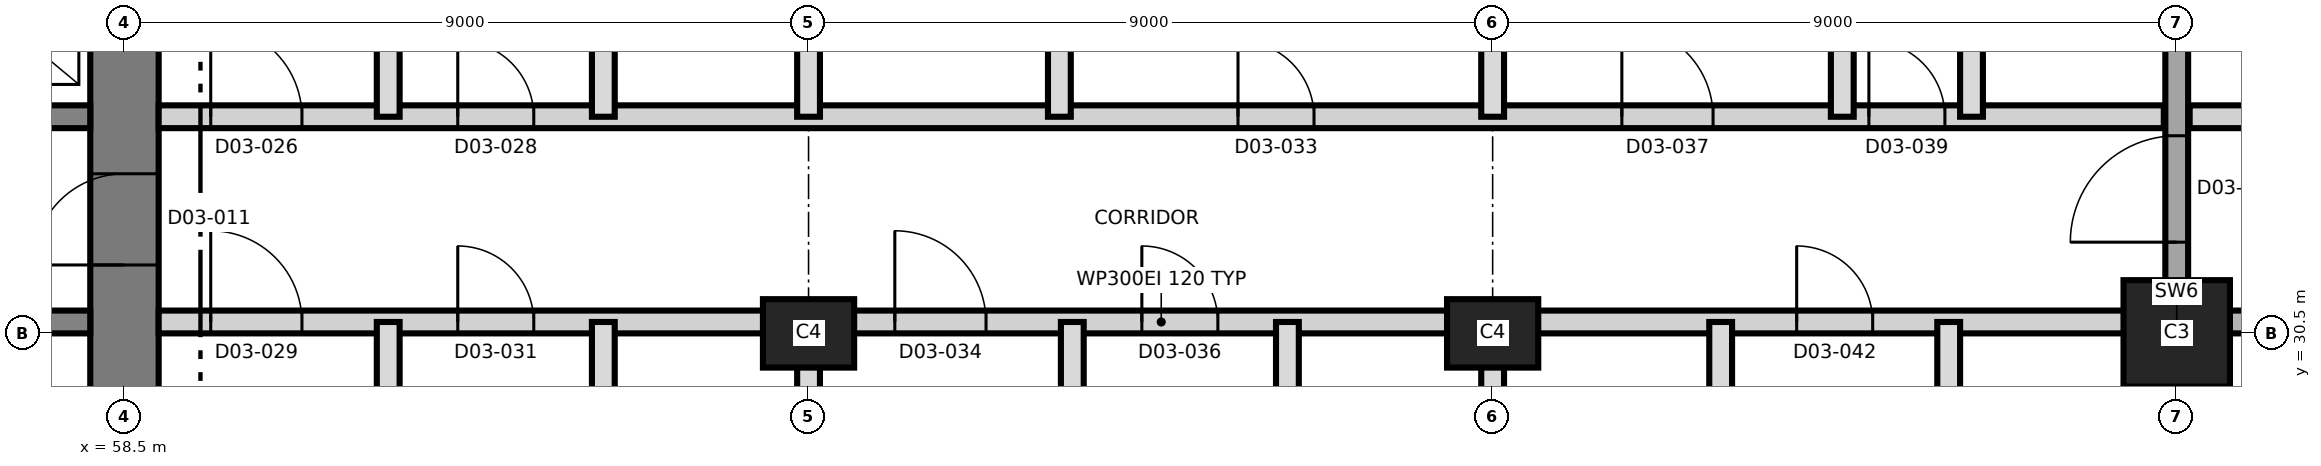
"""IFC4 building model, lengths in metres.
Left out: names, types, materials, properties, quantities, classifications, styles, units other than length and angle.
Written with IfcOpenShell. Run it as: python <this file> out.ifc"""

import sys

from ifc_helpers import new_model, si_unit, direction, frame, frame_2d, origin, origin_2d, place, context, subcontext, project, spatial, rectangle, extrude, element, fill, save


model = new_model("IFC4")
c1 = context("Model", 3, precision=1e-05, world=origin(), true_north=direction((0.0, 1.0)))
c2 = subcontext(c1, "Body", "Model", "MODEL_VIEW")
j1 = project(units=[si_unit("LENGTHUNIT", "METRE"), si_unit("PLANEANGLEUNIT", "RADIAN")], contexts=[c1])
p1 = place(None, origin())
s1 = spatial("IfcSite", under=j1, at=p1, CompositionType="ELEMENT")
p2 = place(p1, origin())
s2 = spatial("IfcBuilding", under=s1, at=p2, CompositionType="ELEMENT")
p3 = place(p2, frame((0.0, 0.0, 52.0)))
s3 = spatial("IfcBuildingStorey", under=s2, at=p3, CompositionType="ELEMENT", Elevation=52.0)
p4 = place(p3, frame((58.5, 21.05, 0.0), z_axis=(0.0, 0.0, 1.0), x_axis=(0.0, 1.0, 0.0)))
e1 = element("IfcWall", 1, at=p4, inside=s3, PredefinedType="SHEAR", context=c2, shape_type="SweptSolid", body=[
    extrude(rectangle(XDim=18.9, YDim=0.9, at=frame_2d((9.45, 0.0))), origin(), (0.0, 0.0, 1.0), 3.7),
])
p5 = place(p4, frame((10.35, 0.0, 0.0)))
e2 = element("IfcOpeningElement", 2, at=p5, cuts=e1, PredefinedType="OPENING", context=c2, shape_type="SweptSolid", body=[
    extrude(rectangle(XDim=1.2, YDim=2.1, at=frame_2d((0.6, 1.05))), frame((0.0, 0.46, 0.0), z_axis=(0.0, -1.0, 0.0), x_axis=(1.0, 0.0, 0.0)), (0.0, 0.0, 1.0), 0.92),
])
p6 = place(p3, frame((31.95, 30.65, 0.0), z_axis=(0.0, 0.0, 1.0), x_axis=(1.0, 0.0, 0.0)))
e3 = element("IfcWall", 3, at=p6, inside=s3, PredefinedType="SHEAR", context=c2, shape_type="SweptSolid", body=[
    extrude(rectangle(XDim=26.1, YDim=0.3, at=frame_2d((13.05, 0.0))), origin(), (0.0, 0.0, 1.0), 3.7),
])
p7 = place(p6, frame((24.55, 0.0, 0.0)))
e4 = element("IfcOpeningElement", 4, at=p7, cuts=e3, PredefinedType="OPENING", context=c2, shape_type="SweptSolid", body=[
    extrude(rectangle(XDim=1.0, YDim=2.1, at=frame_2d((0.5, 1.05))), frame((0.0, 0.16, 0.0), z_axis=(0.0, -1.0, 0.0), x_axis=(1.0, 0.0, 0.0)), (0.0, 0.0, 1.0), 0.32),
])
p8 = place(p6, frame((11.35, 0.0, 0.0)))
e5 = element("IfcOpeningElement", 5, at=p8, cuts=e3, PredefinedType="OPENING", context=c2, shape_type="SweptSolid", body=[
    extrude(rectangle(XDim=1.0, YDim=2.1, at=frame_2d((0.5, 1.05))), frame((0.0, 0.16, 0.0), z_axis=(0.0, -1.0, 0.0), x_axis=(1.0, 0.0, 0.0)), (0.0, 0.0, 1.0), 0.32),
])
p9 = place(p3, frame((31.95, 33.35, 0.0), z_axis=(0.0, 0.0, 1.0), x_axis=(1.0, 0.0, 0.0)))
e6 = element("IfcWall", 6, at=p9, inside=s3, PredefinedType="SHEAR", context=c2, shape_type="SweptSolid", body=[
    extrude(rectangle(XDim=26.1, YDim=0.3, at=frame_2d((13.05, 0.0))), origin(), (0.0, 0.0, 1.0), 3.7),
])
p10 = place(p9, frame((13.125, 0.0, 0.0)))
e7 = element("IfcOpeningElement", 7, at=p10, cuts=e6, PredefinedType="OPENING", context=c2, shape_type="SweptSolid", body=[
    extrude(rectangle(XDim=1.4, YDim=2.1, at=frame_2d((0.7, 1.05))), frame((0.0, 0.16, 0.0), z_axis=(0.0, -1.0, 0.0), x_axis=(1.0, 0.0, 0.0)), (0.0, 0.0, 1.0), 0.32),
])
p11 = place(p9, frame((5.175, 0.0, 0.0)))
e8 = element("IfcOpeningElement", 8, at=p11, cuts=e6, PredefinedType="OPENING", context=c2, shape_type="SweptSolid", body=[
    extrude(rectangle(XDim=1.2, YDim=2.1, at=frame_2d((0.6, 1.05))), frame((0.0, 0.16, 0.0), z_axis=(0.0, -1.0, 0.0), x_axis=(1.0, 0.0, 0.0)), (0.0, 0.0, 1.0), 0.32),
])
p12 = place(p9, frame((19.725, 0.0, 0.0)))
e9 = element("IfcOpeningElement", 9, at=p12, cuts=e6, PredefinedType="OPENING", context=c2, shape_type="SweptSolid", body=[
    extrude(rectangle(XDim=1.2, YDim=2.1, at=frame_2d((0.6, 1.05))), frame((0.0, 0.16, 0.0), z_axis=(0.0, -1.0, 0.0), x_axis=(1.0, 0.0, 0.0)), (0.0, 0.0, 1.0), 0.32),
])
for number, where, z_axis, x_axis in (
    (10, (67.5, 30.5, 0.0), (0.0, 0.0, 1.0), (1.0, 0.0, 0.0)),
    (11, (76.5, 30.5, 0.0), (0.0, 0.0, 1.0), (1.0, 0.0, 0.0)),
):
    element("IfcColumn", number, at=place(p3, frame(where, z_axis=z_axis, x_axis=x_axis)), inside=s3, PredefinedType="COLUMN", context=c2, shape_type="SweptSolid", body=[
        extrude(rectangle(XDim=1.2, YDim=0.9, at=origin_2d()), origin(), (0.0, 0.0, 1.0), 3.7),
    ])
p13 = place(p3, frame((85.5, 30.5, 0.0), z_axis=(0.0, 0.0, 1.0), x_axis=(1.0, 0.0, 0.0)))
e12 = element("IfcColumn", 12, at=p13, inside=s3, PredefinedType="COLUMN", context=c2, shape_type="SweptSolid", body=[
    extrude(rectangle(XDim=1.4, YDim=1.4, at=origin_2d()), origin(), (0.0, 0.0, 1.0), 3.7),
])
p14 = place(p3, frame((85.5, 19.705, 0.0), z_axis=(0.0, 0.0, 1.0), x_axis=(0.0, 1.0, 0.0)))
e13 = element("IfcWall", 13, at=p14, inside=s3, PredefinedType="SHEAR", context=c2, shape_type="SweptSolid", body=[
    extrude(rectangle(XDim=21.59, YDim=0.3, at=frame_2d((10.795, 0.0))), origin(), (0.0, 0.0, 1.0), 3.7),
])
p15 = place(p14, frame((11.995, 0.0, 0.0)))
e14 = element("IfcOpeningElement", 14, at=p15, cuts=e13, PredefinedType="OPENING", context=c2, shape_type="SweptSolid", body=[
    extrude(rectangle(XDim=1.4, YDim=2.1, at=frame_2d((0.7, 1.05))), frame((0.0, 0.16, 0.0), z_axis=(0.0, -1.0, 0.0), x_axis=(1.0, 0.0, 0.0)), (0.0, 0.0, 1.0), 0.32),
])
p16 = place(p3, frame((58.95, 30.65, 0.0), z_axis=(0.0, 0.0, 1.0), x_axis=(1.0, 0.0, 0.0)))
e15 = element("IfcWall", 15, at=p16, inside=s3, PredefinedType="PARTITIONING", context=c2, shape_type="SweptSolid", body=[
    extrude(rectangle(XDim=26.38, YDim=0.3, at=frame_2d((13.19, 0.0))), origin(), (0.0, 0.0, 1.0), 3.4),
])
p17 = place(p16, frame((0.685, 0.0, 0.0)))
e16 = element("IfcOpeningElement", 16, at=p17, cuts=e15, PredefinedType="OPENING", context=c2, shape_type="SweptSolid", body=[
    extrude(rectangle(XDim=1.2, YDim=2.1, at=frame_2d((0.6, 1.05))), frame((0.0, 0.16, 0.0), z_axis=(0.0, -1.0, 0.0), x_axis=(1.0, 0.0, 0.0)), (0.0, 0.0, 1.0), 0.32),
])
p18 = place(p16, frame((3.935, 0.0, 0.0)))
e17 = element("IfcOpeningElement", 17, at=p18, cuts=e15, PredefinedType="OPENING", context=c2, shape_type="SweptSolid", body=[
    extrude(rectangle(XDim=1.0, YDim=2.1, at=frame_2d((0.5, 1.05))), frame((0.0, 0.16, 0.0), z_axis=(0.0, -1.0, 0.0), x_axis=(1.0, 0.0, 0.0)), (0.0, 0.0, 1.0), 0.32),
])
p19 = place(p16, frame((9.685, 0.0, 0.0)))
e18 = element("IfcOpeningElement", 18, at=p19, cuts=e15, PredefinedType="OPENING", context=c2, shape_type="SweptSolid", body=[
    extrude(rectangle(XDim=1.2, YDim=2.1, at=frame_2d((0.6, 1.05))), frame((0.0, 0.16, 0.0), z_axis=(0.0, -1.0, 0.0), x_axis=(1.0, 0.0, 0.0)), (0.0, 0.0, 1.0), 0.32),
])
p20 = place(p16, frame((12.935, 0.0, 0.0)))
e19 = element("IfcOpeningElement", 19, at=p20, cuts=e15, PredefinedType="OPENING", context=c2, shape_type="SweptSolid", body=[
    extrude(rectangle(XDim=1.0, YDim=2.1, at=frame_2d((0.5, 1.05))), frame((0.0, 0.16, 0.0), z_axis=(0.0, -1.0, 0.0), x_axis=(1.0, 0.0, 0.0)), (0.0, 0.0, 1.0), 0.32),
])
p21 = place(p16, frame((21.55, 0.0, 0.0)))
e20 = element("IfcOpeningElement", 20, at=p21, cuts=e15, PredefinedType="OPENING", context=c2, shape_type="SweptSolid", body=[
    extrude(rectangle(XDim=1.0, YDim=2.4, at=frame_2d((0.5, 1.2))), frame((0.0, 0.16, 0.0), z_axis=(0.0, -1.0, 0.0), x_axis=(1.0, 0.0, 0.0)), (0.0, 0.0, 1.0), 0.32),
])
p22 = place(p3, frame((85.67, 30.65, 0.0), z_axis=(0.0, 0.0, 1.0), x_axis=(1.0, 0.0, 0.0)))
e21 = element("IfcWall", 21, at=p22, inside=s3, PredefinedType="SHEAR", context=c2, shape_type="SweptSolid", body=[
    extrude(rectangle(XDim=9.58, YDim=0.3, at=frame_2d((4.79, 0.0))), origin(), (0.0, 0.0, 1.0), 3.4),
])
p23 = place(p22, frame((2.08, 0.0, 0.0)))
e22 = element("IfcOpeningElement", 22, at=p23, cuts=e21, PredefinedType="OPENING", context=c2, shape_type="SweptSolid", body=[
    extrude(rectangle(XDim=1.2, YDim=2.1, at=frame_2d((0.6, 1.05))), frame((0.0, 0.16, 0.0), z_axis=(0.0, -1.0, 0.0), x_axis=(1.0, 0.0, 0.0)), (0.0, 0.0, 1.0), 0.32),
])
p24 = place(p22, frame((5.63, 0.0, 0.0)))
e23 = element("IfcOpeningElement", 23, at=p24, cuts=e21, PredefinedType="OPENING", context=c2, shape_type="SweptSolid", body=[
    extrude(rectangle(XDim=1.0, YDim=2.1, at=frame_2d((0.5, 1.05))), frame((0.0, 0.16, 0.0), z_axis=(0.0, -1.0, 0.0), x_axis=(1.0, 0.0, 0.0)), (0.0, 0.0, 1.0), 0.32),
])
p25 = place(p3, frame((58.95, 33.35, 0.0), z_axis=(0.0, 0.0, 1.0), x_axis=(1.0, 0.0, 0.0)))
e24 = element("IfcWall", 24, at=p25, inside=s3, PredefinedType="PARTITIONING", context=c2, shape_type="SweptSolid", body=[
    extrude(rectangle(XDim=26.38, YDim=0.3, at=frame_2d((13.19, 0.0))), origin(), (0.0, 0.0, 1.0), 3.4),
])
p26 = place(p25, frame((0.685, 0.0, 0.0)))
e25 = element("IfcOpeningElement", 25, at=p26, cuts=e24, PredefinedType="OPENING", context=c2, shape_type="SweptSolid", body=[
    extrude(rectangle(XDim=1.2, YDim=2.1, at=frame_2d((0.6, 1.05))), frame((0.0, 0.16, 0.0), z_axis=(0.0, -1.0, 0.0), x_axis=(1.0, 0.0, 0.0)), (0.0, 0.0, 1.0), 0.32),
])
p27 = place(p25, frame((3.935, 0.0, 0.0)))
e26 = element("IfcOpeningElement", 26, at=p27, cuts=e24, PredefinedType="OPENING", context=c2, shape_type="SweptSolid", body=[
    extrude(rectangle(XDim=1.0, YDim=2.1, at=frame_2d((0.5, 1.05))), frame((0.0, 0.16, 0.0), z_axis=(0.0, -1.0, 0.0), x_axis=(1.0, 0.0, 0.0)), (0.0, 0.0, 1.0), 0.32),
])
p28 = place(p25, frame((14.2, 0.0, 0.0)))
e27 = element("IfcOpeningElement", 27, at=p28, cuts=e24, PredefinedType="OPENING", context=c2, shape_type="SweptSolid", body=[
    extrude(rectangle(XDim=1.0, YDim=2.4, at=frame_2d((0.5, 1.2))), frame((0.0, 0.16, 0.0), z_axis=(0.0, -1.0, 0.0), x_axis=(1.0, 0.0, 0.0)), (0.0, 0.0, 1.0), 0.32),
])
p29 = place(p25, frame((19.25, 0.0, 0.0)))
e28 = element("IfcOpeningElement", 28, at=p29, cuts=e24, PredefinedType="OPENING", context=c2, shape_type="SweptSolid", body=[
    extrude(rectangle(XDim=1.2, YDim=2.1, at=frame_2d((0.6, 1.05))), frame((0.0, 0.16, 0.0), z_axis=(0.0, -1.0, 0.0), x_axis=(1.0, 0.0, 0.0)), (0.0, 0.0, 1.0), 0.32),
])
p30 = place(p25, frame((22.5, 0.0, 0.0)))
e29 = element("IfcOpeningElement", 29, at=p30, cuts=e24, PredefinedType="OPENING", context=c2, shape_type="SweptSolid", body=[
    extrude(rectangle(XDim=1.0, YDim=2.1, at=frame_2d((0.5, 1.05))), frame((0.0, 0.16, 0.0), z_axis=(0.0, -1.0, 0.0), x_axis=(1.0, 0.0, 0.0)), (0.0, 0.0, 1.0), 0.32),
])
p31 = place(p3, frame((85.67, 33.35, 0.0), z_axis=(0.0, 0.0, 1.0), x_axis=(1.0, 0.0, 0.0)))
e30 = element("IfcWall", 30, at=p31, inside=s3, PredefinedType="PARTITIONING", context=c2, shape_type="SweptSolid", body=[
    extrude(rectangle(XDim=9.58, YDim=0.3, at=frame_2d((4.79, 0.0))), origin(), (0.0, 0.0, 1.0), 3.4),
])
p32 = place(p31, frame((1.83, 0.0, 0.0)))
e31 = element("IfcOpeningElement", 31, at=p32, cuts=e30, PredefinedType="OPENING", context=c2, shape_type="SweptSolid", body=[
    extrude(rectangle(XDim=1.0, YDim=2.1, at=frame_2d((0.5, 1.05))), frame((0.0, 0.16, 0.0), z_axis=(0.0, -1.0, 0.0), x_axis=(1.0, 0.0, 0.0)), (0.0, 0.0, 1.0), 0.32),
])
p33 = place(p31, frame((5.63, 0.0, 0.0)))
e32 = element("IfcOpeningElement", 32, at=p33, cuts=e30, PredefinedType="OPENING", context=c2, shape_type="SweptSolid", body=[
    extrude(rectangle(XDim=1.0, YDim=2.1, at=frame_2d((0.5, 1.05))), frame((0.0, 0.16, 0.0), z_axis=(0.0, -1.0, 0.0), x_axis=(1.0, 0.0, 0.0)), (0.0, 0.0, 1.0), 0.32),
])
p34 = place(p3, frame((61.97, 19.705, 0.0), z_axis=(0.0, 0.0, 1.0), x_axis=(0.0, 1.0, 0.0)))
e33 = element("IfcWall", 33, at=p34, inside=s3, PredefinedType="PARTITIONING", context=c2, shape_type="SweptSolid", body=[
    extrude(rectangle(XDim=10.945, YDim=0.3, at=frame_2d((5.472, 0.0))), origin(), (0.0, 0.0, 1.0), 3.4),
])
p35 = place(p3, frame((61.97, 33.35, 0.0), z_axis=(0.0, 0.0, 1.0), x_axis=(0.0, 1.0, 0.0)))
e34 = element("IfcWall", 34, at=p35, inside=s3, PredefinedType="PARTITIONING", context=c2, shape_type="SweptSolid", body=[
    extrude(rectangle(XDim=8.125, YDim=0.3, at=frame_2d((4.062, 0.0))), origin(), (0.0, 0.0, 1.0), 3.4),
])
for number, where, z_axis, x_axis in (
    (35, (64.8, 27.45, 0.0), (0.0, 0.0, 1.0), (0.0, 1.0, 0.0)),
    (36, (64.8, 33.35, 0.0), (0.0, 0.0, 1.0), (0.0, 1.0, 0.0)),
):
    element("IfcWall", number, at=place(p3, frame(where, z_axis=z_axis, x_axis=x_axis)), inside=s3, PredefinedType="PARTITIONING", context=c2, shape_type="SweptSolid", body=[
        extrude(rectangle(XDim=3.2, YDim=0.3, at=frame_2d((1.6, 0.0))), origin(), (0.0, 0.0, 1.0), 3.4),
    ])
p36 = place(p3, frame((67.5, 19.705, 0.0), z_axis=(0.0, 0.0, 1.0), x_axis=(0.0, 1.0, 0.0)))
e37 = element("IfcWall", 37, at=p36, inside=s3, PredefinedType="PARTITIONING", context=c2, shape_type="SweptSolid", body=[
    extrude(rectangle(XDim=10.945, YDim=0.3, at=frame_2d((5.472, 0.0))), origin(), (0.0, 0.0, 1.0), 3.4),
])
p37 = place(p3, frame((67.5, 33.35, 0.0), z_axis=(0.0, 0.0, 1.0), x_axis=(0.0, 1.0, 0.0)))
e38 = element("IfcWall", 38, at=p37, inside=s3, PredefinedType="PARTITIONING", context=c2, shape_type="SweptSolid", body=[
    extrude(rectangle(XDim=8.125, YDim=0.3, at=frame_2d((4.062, 0.0))), origin(), (0.0, 0.0, 1.0), 3.4),
])
p38 = place(p3, frame((70.8, 33.35, 0.0), z_axis=(0.0, 0.0, 1.0), x_axis=(0.0, 1.0, 0.0)))
e39 = element("IfcWall", 39, at=p38, inside=s3, PredefinedType="PARTITIONING", context=c2, shape_type="SweptSolid", body=[
    extrude(rectangle(XDim=3.5, YDim=0.3, at=frame_2d((1.75, 0.0))), origin(), (0.0, 0.0, 1.0), 3.4),
])
p39 = place(p3, frame((70.97, 19.705, 0.0), z_axis=(0.0, 0.0, 1.0), x_axis=(0.0, 1.0, 0.0)))
e40 = element("IfcWall", 40, at=p39, inside=s3, PredefinedType="PARTITIONING", context=c2, shape_type="SweptSolid", body=[
    extrude(rectangle(XDim=10.945, YDim=0.3, at=frame_2d((5.472, 0.0))), origin(), (0.0, 0.0, 1.0), 3.4),
])
p40 = place(p3, frame((73.8, 27.45, 0.0), z_axis=(0.0, 0.0, 1.0), x_axis=(0.0, 1.0, 0.0)))
e41 = element("IfcWall", 41, at=p40, inside=s3, PredefinedType="PARTITIONING", context=c2, shape_type="SweptSolid", body=[
    extrude(rectangle(XDim=3.2, YDim=0.3, at=frame_2d((1.6, 0.0))), origin(), (0.0, 0.0, 1.0), 3.4),
])
p41 = place(p3, frame((76.5, 19.705, 0.0), z_axis=(0.0, 0.0, 1.0), x_axis=(0.0, 1.0, 0.0)))
e42 = element("IfcWall", 42, at=p41, inside=s3, PredefinedType="PARTITIONING", context=c2, shape_type="SweptSolid", body=[
    extrude(rectangle(XDim=10.945, YDim=0.3, at=frame_2d((5.472, 0.0))), origin(), (0.0, 0.0, 1.0), 3.4),
])
p42 = place(p3, frame((76.5, 33.35, 0.0), z_axis=(0.0, 0.0, 1.0), x_axis=(0.0, 1.0, 0.0)))
e43 = element("IfcWall", 43, at=p42, inside=s3, PredefinedType="PARTITIONING", context=c2, shape_type="SweptSolid", body=[
    extrude(rectangle(XDim=8.125, YDim=0.3, at=frame_2d((4.062, 0.0))), origin(), (0.0, 0.0, 1.0), 3.4),
])
p43 = place(p3, frame((79.5, 27.35, 0.0), z_axis=(0.0, 0.0, 1.0), x_axis=(0.0, 1.0, 0.0)))
e44 = element("IfcWall", 44, at=p43, inside=s3, PredefinedType="PARTITIONING", context=c2, shape_type="SweptSolid", body=[
    extrude(rectangle(XDim=3.3, YDim=0.3, at=frame_2d((1.65, 0.0))), origin(), (0.0, 0.0, 1.0), 3.4),
])
p44 = place(p3, frame((81.1, 33.35, 0.0), z_axis=(0.0, 0.0, 1.0), x_axis=(0.0, 1.0, 0.0)))
e45 = element("IfcWall", 45, at=p44, inside=s3, PredefinedType="PARTITIONING", context=c2, shape_type="SweptSolid", body=[
    extrude(rectangle(XDim=8.125, YDim=0.3, at=frame_2d((4.062, 0.0))), origin(), (0.0, 0.0, 1.0), 3.4),
])
p45 = place(p3, frame((82.5, 27.35, 0.0), z_axis=(0.0, 0.0, 1.0), x_axis=(0.0, 1.0, 0.0)))
e46 = element("IfcWall", 46, at=p45, inside=s3, PredefinedType="PARTITIONING", context=c2, shape_type="SweptSolid", body=[
    extrude(rectangle(XDim=3.3, YDim=0.3, at=frame_2d((1.65, 0.0))), origin(), (0.0, 0.0, 1.0), 3.4),
])
p46 = place(p3, frame((82.8, 33.35, 0.0), z_axis=(0.0, 0.0, 1.0), x_axis=(0.0, 1.0, 0.0)))
e47 = element("IfcWall", 47, at=p46, inside=s3, PredefinedType="PARTITIONING", context=c2, shape_type="SweptSolid", body=[
    extrude(rectangle(XDim=3.2, YDim=0.3, at=frame_2d((1.6, 0.0))), origin(), (0.0, 0.0, 1.0), 3.4),
])
p47 = place(p5, origin())
e48 = element("IfcDoor", 48, at=p47, inside=s3, OperationType="SINGLE_SWING_LEFT", PredefinedType="DOOR", context=c2, shape_type="SweptSolid", body=[
    extrude(rectangle(XDim=1.2, YDim=2.1, at=frame_2d((0.6, 1.05))), frame((0.0, 0.025, 0.0), z_axis=(0.0, -1.0, 0.0), x_axis=(1.0, 0.0, 0.0)), (0.0, 0.0, 1.0), 0.05),
])
fill(e2, e48)
p48 = place(p26, origin())
e49 = element("IfcDoor", 49, at=p48, inside=s3, OperationType="SINGLE_SWING_LEFT", PredefinedType="DOOR", context=c2, shape_type="SweptSolid", body=[
    extrude(rectangle(XDim=1.2, YDim=2.1, at=frame_2d((0.6, 1.05))), frame((0.0, 0.025, 0.0), z_axis=(0.0, -1.0, 0.0), x_axis=(1.0, 0.0, 0.0)), (0.0, 0.0, 1.0), 0.05),
])
fill(e25, e49)
p49 = place(p27, origin())
e50 = element("IfcDoor", 50, at=p49, inside=s3, OperationType="SINGLE_SWING_LEFT", PredefinedType="DOOR", context=c2, shape_type="SweptSolid", body=[
    extrude(rectangle(XDim=1.0, YDim=2.1, at=frame_2d((0.5, 1.05))), frame((0.0, 0.025, 0.0), z_axis=(0.0, -1.0, 0.0), x_axis=(1.0, 0.0, 0.0)), (0.0, 0.0, 1.0), 0.05),
])
fill(e26, e50)
p50 = place(p17, origin())
e51 = element("IfcDoor", 51, at=p50, inside=s3, OperationType="SINGLE_SWING_LEFT", PredefinedType="DOOR", context=c2, shape_type="SweptSolid", body=[
    extrude(rectangle(XDim=1.2, YDim=2.1, at=frame_2d((0.6, 1.05))), frame((0.0, 0.025, 0.0), z_axis=(0.0, -1.0, 0.0), x_axis=(1.0, 0.0, 0.0)), (0.0, 0.0, 1.0), 0.05),
])
fill(e16, e51)
p51 = place(p18, origin())
e52 = element("IfcDoor", 52, at=p51, inside=s3, OperationType="SINGLE_SWING_LEFT", PredefinedType="DOOR", context=c2, shape_type="SweptSolid", body=[
    extrude(rectangle(XDim=1.0, YDim=2.1, at=frame_2d((0.5, 1.05))), frame((0.0, 0.025, 0.0), z_axis=(0.0, -1.0, 0.0), x_axis=(1.0, 0.0, 0.0)), (0.0, 0.0, 1.0), 0.05),
])
fill(e17, e52)
p52 = place(p28, origin())
e53 = element("IfcDoor", 53, at=p52, inside=s3, OperationType="SINGLE_SWING_LEFT", PredefinedType="DOOR", context=c2, shape_type="SweptSolid", body=[
    extrude(rectangle(XDim=1.0, YDim=2.4, at=frame_2d((0.5, 1.2))), frame((0.0, 0.025, 0.0), z_axis=(0.0, -1.0, 0.0), x_axis=(1.0, 0.0, 0.0)), (0.0, 0.0, 1.0), 0.05),
])
fill(e27, e53)
p53 = place(p19, origin())
e54 = element("IfcDoor", 54, at=p53, inside=s3, OperationType="SINGLE_SWING_RIGHT", PredefinedType="DOOR", context=c2, shape_type="SweptSolid", body=[
    extrude(rectangle(XDim=1.2, YDim=2.1, at=frame_2d((0.6, 1.05))), frame((0.0, 0.025, 0.0), z_axis=(0.0, -1.0, 0.0), x_axis=(1.0, 0.0, 0.0)), (0.0, 0.0, 1.0), 0.05),
])
fill(e18, e54)
p54 = place(p20, origin())
e55 = element("IfcDoor", 55, at=p54, inside=s3, OperationType="SINGLE_SWING_LEFT", PredefinedType="DOOR", context=c2, shape_type="SweptSolid", body=[
    extrude(rectangle(XDim=1.0, YDim=2.1, at=frame_2d((0.5, 1.05))), frame((0.0, 0.025, 0.0), z_axis=(0.0, -1.0, 0.0), x_axis=(1.0, 0.0, 0.0)), (0.0, 0.0, 1.0), 0.05),
])
fill(e19, e55)
p55 = place(p29, origin())
e56 = element("IfcDoor", 56, at=p55, inside=s3, OperationType="SINGLE_SWING_RIGHT", PredefinedType="DOOR", context=c2, shape_type="SweptSolid", body=[
    extrude(rectangle(XDim=1.2, YDim=2.1, at=frame_2d((0.6, 1.05))), frame((0.0, 0.025, 0.0), z_axis=(0.0, -1.0, 0.0), x_axis=(1.0, 0.0, 0.0)), (0.0, 0.0, 1.0), 0.05),
])
fill(e28, e56)
p56 = place(p30, origin())
e57 = element("IfcDoor", 57, at=p56, inside=s3, OperationType="SINGLE_SWING_LEFT", PredefinedType="DOOR", context=c2, shape_type="SweptSolid", body=[
    extrude(rectangle(XDim=1.0, YDim=2.1, at=frame_2d((0.5, 1.05))), frame((0.0, 0.025, 0.0), z_axis=(0.0, -1.0, 0.0), x_axis=(1.0, 0.0, 0.0)), (0.0, 0.0, 1.0), 0.05),
])
fill(e29, e57)
p57 = place(p21, origin())
e58 = element("IfcDoor", 58, at=p57, inside=s3, OperationType="SINGLE_SWING_RIGHT", PredefinedType="DOOR", context=c2, shape_type="SweptSolid", body=[
    extrude(rectangle(XDim=1.0, YDim=2.4, at=frame_2d((0.5, 1.2))), frame((0.0, 0.025, 0.0), z_axis=(0.0, -1.0, 0.0), x_axis=(1.0, 0.0, 0.0)), (0.0, 0.0, 1.0), 0.05),
])
fill(e20, e58)
p58 = place(p15, origin())
e59 = element("IfcDoor", 59, at=p58, inside=s3, OperationType="SINGLE_SWING_RIGHT", PredefinedType="DOOR", context=c2, shape_type="SweptSolid", body=[
    extrude(rectangle(XDim=1.4, YDim=2.1, at=frame_2d((0.7, 1.05))), frame((0.0, 0.025, 0.0), z_axis=(0.0, -1.0, 0.0), x_axis=(1.0, 0.0, 0.0)), (0.0, 0.0, 1.0), 0.05),
])
fill(e14, e59)
save(model, sys.argv[1])
